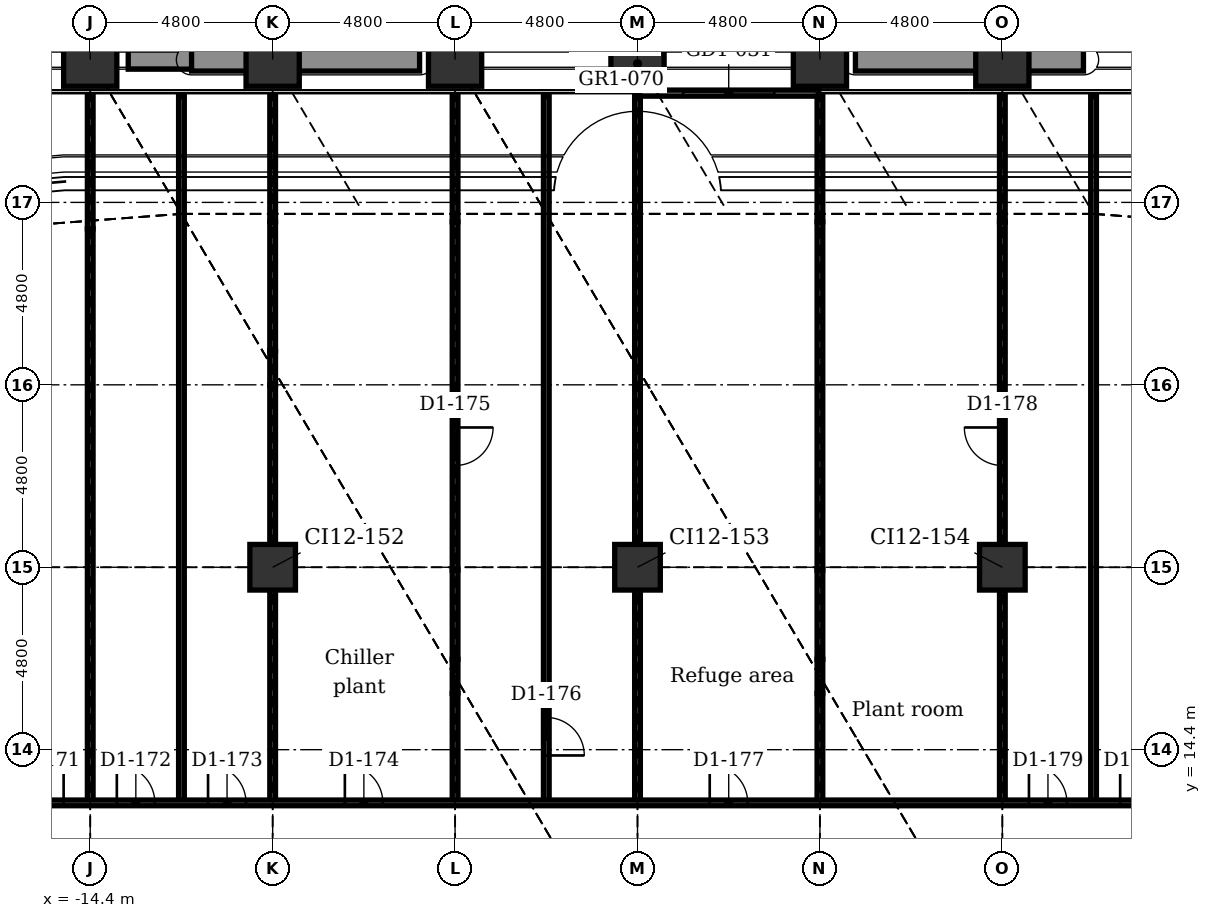
"""IFC4 building model, lengths in metres.
Left out: names, types, materials, properties, quantities, classifications, styles, units other than length and angle.
Written with IfcOpenShell. Run it as: python <this file> out.ifc"""

import sys

from ifc_helpers import new_model, si_unit, direction, frame, frame_2d, origin, origin_2d, place, context, subcontext, project, spatial, rectangle, extrude, element, fill, save


model = new_model("IFC4")
c1 = context("Model", 3, precision=1e-05, world=origin(), true_north=direction((0.0, 1.0)))
c2 = subcontext(c1, "Body", "Model", "MODEL_VIEW")
j1 = project(units=[si_unit("LENGTHUNIT", "METRE"), si_unit("PLANEANGLEUNIT", "RADIAN")], contexts=[c1])
p1 = place(None, origin())
s1 = spatial("IfcSite", under=j1, at=p1, CompositionType="ELEMENT")
p2 = place(p1, origin())
s2 = spatial("IfcBuilding", under=s1, at=p2, CompositionType="ELEMENT")
p3 = place(p2, frame((0.0, 0.0, 71.9)))
s3 = spatial("IfcBuildingStorey", under=s2, at=p3, CompositionType="ELEMENT", Elevation=71.9)
for number, where, z_axis, x_axis in (
    (1, (-14.4, 32.555, -0.3), (0.0, 0.0, 1.0), (1.0, 0.0, 0.0)),
    (2, (-9.6, 32.555, -0.3), (0.0, 0.0, 1.0), (1.0, 0.0, 0.0)),
    (3, (-4.8, 32.555, -0.3), (0.0, 0.0, 1.0), (1.0, 0.0, 0.0)),
    (4, (0.0, 32.555, -0.3), (0.0, 0.0, 1.0), (1.0, 0.0, 0.0)),
    (5, (4.8, 32.555, -0.3), (0.0, 0.0, 1.0), (1.0, 0.0, 0.0)),
    (6, (9.6, 32.555, -0.3), (0.0, 0.0, 1.0), (1.0, 0.0, 0.0)),
):
    element("IfcColumn", number, at=place(p3, frame(where, z_axis=z_axis, x_axis=x_axis)), inside=s3, PredefinedType="COLUMN", context=c2, shape_type="SweptSolid", body=[
        extrude(rectangle(XDim=1.4, YDim=1.4, at=origin_2d()), origin(), (0.0, 0.0, 1.0), 6.1),
    ])
for number, where, z_axis, x_axis in (
    (7, (-9.6, 19.2, -0.3), (0.0, 0.0, 1.0), (1.0, 0.0, 0.0)),
    (8, (0.0, 19.2, -0.3), (0.0, 0.0, 1.0), (1.0, 0.0, 0.0)),
    (9, (9.6, 19.2, -0.3), (0.0, 0.0, 1.0), (1.0, 0.0, 0.0)),
):
    element("IfcColumn", number, at=place(p3, frame(where, z_axis=z_axis, x_axis=x_axis)), inside=s3, PredefinedType="COLUMN", context=c2, shape_type="SweptSolid", body=[
        extrude(rectangle(XDim=1.2, YDim=1.2, at=origin_2d()), origin(), (0.0, 0.0, 1.0), 6.1),
    ])
p4 = place(p3, frame((0.03, 31.675, 0.0), z_axis=(0.0, 0.0, 1.0), x_axis=(1.0, 0.0, 0.0)))
e10 = element("IfcWall", 10, at=p4, inside=s3, PredefinedType="PARTITIONING", context=c2, shape_type="SweptSolid", body=[
    extrude(rectangle(XDim=4.74, YDim=0.16, at=frame_2d((2.37, 0.0))), origin(), (0.0, 0.0, 1.0), 5.7),
])
p5 = place(p4, frame((1.17, 0.0, 0.0)))
e11 = element("IfcOpeningElement", 11, at=p5, cuts=e10, PredefinedType="OPENING", context=c2, shape_type="SweptSolid", body=[
    extrude(rectangle(XDim=2.4, YDim=2.4, at=frame_2d((1.2, 1.2))), frame((0.0, 0.09, 0.0), z_axis=(0.0, -1.0, 0.0), x_axis=(1.0, 0.0, 0.0)), (0.0, 0.0, 1.0), 0.18),
])
p6 = place(p3, frame((-13.4, 32.605, 0.0), z_axis=(0.0, 0.0, 1.0), x_axis=(1.0, 0.0, 0.0)))
e12 = element("IfcWall", 12, at=p6, inside=s3, PredefinedType="USERDEFINED", context=c2, shape_type="SweptSolid", body=[
    extrude(rectangle(XDim=2.8, YDim=0.6, at=frame_2d((1.4, 0.0))), origin(), (0.0, 0.0, 1.0), 0.7),
])
for number, where, z_axis, x_axis in (
    (13, (-11.734, 32.555, 6.0), (0.0, 0.0, 1.0), (1.0, 0.0, 0.0)),
    (14, (5.734, 32.555, 6.0), (0.0, 0.0, 1.0), (1.0, 0.0, 0.0)),
):
    element("IfcWall", number, at=place(p3, frame(where, z_axis=z_axis, x_axis=x_axis)), inside=s3, PredefinedType="USERDEFINED", context=c2, shape_type="SweptSolid", body=[
        extrude(rectangle(XDim=6.0, YDim=0.6, at=frame_2d((3.0, 0.0))), origin(), (0.0, 0.0, 1.0), 0.7),
    ])
p7 = place(p3, frame((12.0, 13.0, 0.0), z_axis=(0.0, 0.0, 1.0), x_axis=(0.0, 1.0, 0.0)))
e15 = element("IfcWall", 15, at=p7, inside=s3, PredefinedType="PARTITIONING", context=c2, shape_type="SweptSolid", body=[
    extrude(rectangle(XDim=18.585, YDim=0.15, at=frame_2d((9.293, 0.0))), origin(), (0.0, 0.0, 1.0), 5.7),
])
p8 = place(p3, frame((9.6, 13.0, 0.0), z_axis=(0.0, 0.0, 1.0), x_axis=(0.0, 1.0, 0.0)))
e16 = element("IfcWall", 16, at=p8, inside=s3, PredefinedType="PARTITIONING", context=c2, shape_type="SweptSolid", body=[
    extrude(rectangle(XDim=5.6, YDim=0.15, at=frame_2d((2.8, 0.0))), origin(), (0.0, 0.0, 1.0), 5.343),
])
p9 = place(p3, frame((9.6, 19.8, 0.0), z_axis=(0.0, 0.0, 1.0), x_axis=(0.0, 1.0, 0.0)))
e17 = element("IfcWall", 17, at=p9, inside=s3, PredefinedType="PARTITIONING", context=c2, shape_type="SweptSolid", body=[
    extrude(rectangle(XDim=8.489, YDim=0.15, at=frame_2d((4.244, 0.0))), origin(), (0.0, 0.0, 1.0), 5.343),
])
p10 = place(p9, frame((2.078, 0.0, 0.0)))
e18 = element("IfcOpeningElement", 18, at=p10, cuts=e17, PredefinedType="OPENING", context=c2, shape_type="SweptSolid", body=[
    extrude(rectangle(XDim=1.0, YDim=2.1, at=frame_2d((0.5, 1.05))), frame((0.0, 0.085, 0.0), z_axis=(0.0, -1.0, 0.0), x_axis=(1.0, 0.0, 0.0)), (0.0, 0.0, 1.0), 0.17),
])
p11 = place(p3, frame((9.6, 28.289, 0.0), z_axis=(0.0, 0.0, 1.0), x_axis=(0.0, 1.0, 0.0)))
e19 = element("IfcWall", 19, at=p11, inside=s3, PredefinedType="PARTITIONING", context=c2, shape_type="SweptSolid", body=[
    extrude(rectangle(XDim=3.297, YDim=0.15, at=frame_2d((1.648, 0.0))), origin(), (0.0, 0.0, 1.0), 5.7),
])
p12 = place(p3, frame((4.8, 19.126, 0.0), z_axis=(0.0, 0.0, 1.0), x_axis=(0.0, 1.0, 0.0)))
e20 = element("IfcWall", 20, at=p12, inside=s3, PredefinedType="PARTITIONING", context=c2, shape_type="SweptSolid", body=[
    extrude(rectangle(XDim=9.163, YDim=0.15, at=frame_2d((4.581, 0.0))), origin(), (0.0, 0.0, 1.0), 5.343),
])
p13 = place(p3, frame((4.8, 13.0, 0.0), z_axis=(0.0, 0.0, 1.0), x_axis=(0.0, 1.0, 0.0)))
e21 = element("IfcWall", 21, at=p13, inside=s3, PredefinedType="PARTITIONING", context=c2, shape_type="SweptSolid", body=[
    extrude(rectangle(XDim=2.877, YDim=0.15, at=frame_2d((1.438, 0.0))), origin(), (0.0, 0.0, 1.0), 5.49),
])
p14 = place(p3, frame((4.8, 15.877, 0.0), z_axis=(0.0, 0.0, 1.0), x_axis=(0.0, 1.0, 0.0)))
e22 = element("IfcWall", 22, at=p14, inside=s3, PredefinedType="PARTITIONING", context=c2, shape_type="SweptSolid", body=[
    extrude(rectangle(XDim=0.902, YDim=0.15, at=frame_2d((0.451, 0.0))), origin(), (0.0, 0.0, 1.0), 5.7),
])
p15 = place(p3, frame((4.8, 16.779, 0.0), z_axis=(0.0, 0.0, 1.0), x_axis=(0.0, 1.0, 0.0)))
e23 = element("IfcWall", 23, at=p15, inside=s3, PredefinedType="PARTITIONING", context=c2, shape_type="SweptSolid", body=[
    extrude(rectangle(XDim=2.347, YDim=0.15, at=frame_2d((1.174, 0.0))), origin(), (0.0, 0.0, 1.0), 5.49),
])
p16 = place(p3, frame((4.8, 28.289, 0.0), z_axis=(0.0, 0.0, 1.0), x_axis=(0.0, 1.0, 0.0)))
e24 = element("IfcWall", 24, at=p16, inside=s3, PredefinedType="PARTITIONING", context=c2, shape_type="SweptSolid", body=[
    extrude(rectangle(XDim=3.307, YDim=0.15, at=frame_2d((1.653, 0.0))), origin(), (0.0, 0.0, 1.0), 5.7),
])
p17 = place(p3, frame((0.0, 13.0, 0.0), z_axis=(0.0, 0.0, 1.0), x_axis=(0.0, 1.0, 0.0)))
e25 = element("IfcWall", 25, at=p17, inside=s3, PredefinedType="PARTITIONING", context=c2, shape_type="SweptSolid", body=[
    extrude(rectangle(XDim=5.6, YDim=0.15, at=frame_2d((2.8, 0.0))), origin(), (0.0, 0.0, 1.0), 5.343),
])
p18 = place(p3, frame((0.0, 19.8, 0.0), z_axis=(0.0, 0.0, 1.0), x_axis=(0.0, 1.0, 0.0)))
e26 = element("IfcWall", 26, at=p18, inside=s3, PredefinedType="PARTITIONING", context=c2, shape_type="SweptSolid", body=[
    extrude(rectangle(XDim=4.19, YDim=0.15, at=frame_2d((2.095, 0.0))), origin(), (0.0, 0.0, 1.0), 5.49),
])
p19 = place(p3, frame((0.0, 23.99, 0.0), z_axis=(0.0, 0.0, 1.0), x_axis=(0.0, 1.0, 0.0)))
e27 = element("IfcWall", 27, at=p19, inside=s3, PredefinedType="PARTITIONING", context=c2, shape_type="SweptSolid", body=[
    extrude(rectangle(XDim=0.902, YDim=0.15, at=frame_2d((0.451, 0.0))), origin(), (0.0, 0.0, 1.0), 5.7),
])
p20 = place(p3, frame((0.0, 24.893, 0.0), z_axis=(0.0, 0.0, 1.0), x_axis=(0.0, 1.0, 0.0)))
e28 = element("IfcWall", 28, at=p20, inside=s3, PredefinedType="PARTITIONING", context=c2, shape_type="SweptSolid", body=[
    extrude(rectangle(XDim=3.396, YDim=0.15, at=frame_2d((1.698, 0.0))), origin(), (0.0, 0.0, 1.0), 5.49),
])
p21 = place(p3, frame((0.0, 28.289, 0.0), z_axis=(0.0, 0.0, 1.0), x_axis=(0.0, 1.0, 0.0)))
e29 = element("IfcWall", 29, at=p21, inside=s3, PredefinedType="PARTITIONING", context=c2, shape_type="SweptSolid", body=[
    extrude(rectangle(XDim=3.307, YDim=0.15, at=frame_2d((1.653, 0.0))), origin(), (0.0, 0.0, 1.0), 5.7),
])
p22 = place(p3, frame((-2.4, 13.0, 0.0), z_axis=(0.0, 0.0, 1.0), x_axis=(0.0, 1.0, 0.0)))
e30 = element("IfcWall", 30, at=p22, inside=s3, PredefinedType="PARTITIONING", context=c2, shape_type="SweptSolid", body=[
    extrude(rectangle(XDim=18.585, YDim=0.15, at=frame_2d((9.293, 0.0))), origin(), (0.0, 0.0, 1.0), 5.7),
])
p23 = place(p22, frame((1.248, 0.0, 0.0)))
e31 = element("IfcOpeningElement", 31, at=p23, cuts=e30, PredefinedType="OPENING", context=c2, shape_type="SweptSolid", body=[
    extrude(rectangle(XDim=1.0, YDim=2.1, at=frame_2d((0.5, 1.05))), frame((0.0, 0.085, 0.0), z_axis=(0.0, -1.0, 0.0), x_axis=(1.0, 0.0, 0.0)), (0.0, 0.0, 1.0), 0.17),
])
p24 = place(p3, frame((-4.8, 19.126, 0.0), z_axis=(0.0, 0.0, 1.0), x_axis=(0.0, 1.0, 0.0)))
e32 = element("IfcWall", 32, at=p24, inside=s3, PredefinedType="PARTITIONING", context=c2, shape_type="SweptSolid", body=[
    extrude(rectangle(XDim=9.163, YDim=0.15, at=frame_2d((4.581, 0.0))), origin(), (0.0, 0.0, 1.0), 5.343),
])
p25 = place(p24, frame((2.752, 0.0, 0.0)))
e33 = element("IfcOpeningElement", 33, at=p25, cuts=e32, PredefinedType="OPENING", context=c2, shape_type="SweptSolid", body=[
    extrude(rectangle(XDim=1.0, YDim=2.1, at=frame_2d((0.5, 1.05))), frame((0.0, 0.085, 0.0), z_axis=(0.0, -1.0, 0.0), x_axis=(1.0, 0.0, 0.0)), (0.0, 0.0, 1.0), 0.17),
])
p26 = place(p3, frame((-4.8, 13.0, 0.0), z_axis=(0.0, 0.0, 1.0), x_axis=(0.0, 1.0, 0.0)))
e34 = element("IfcWall", 34, at=p26, inside=s3, PredefinedType="PARTITIONING", context=c2, shape_type="SweptSolid", body=[
    extrude(rectangle(XDim=2.877, YDim=0.15, at=frame_2d((1.438, 0.0))), origin(), (0.0, 0.0, 1.0), 5.49),
])
p27 = place(p3, frame((-4.8, 15.877, 0.0), z_axis=(0.0, 0.0, 1.0), x_axis=(0.0, 1.0, 0.0)))
e35 = element("IfcWall", 35, at=p27, inside=s3, PredefinedType="PARTITIONING", context=c2, shape_type="SweptSolid", body=[
    extrude(rectangle(XDim=0.902, YDim=0.15, at=frame_2d((0.451, 0.0))), origin(), (0.0, 0.0, 1.0), 5.7),
])
p28 = place(p3, frame((-4.8, 16.779, 0.0), z_axis=(0.0, 0.0, 1.0), x_axis=(0.0, 1.0, 0.0)))
e36 = element("IfcWall", 36, at=p28, inside=s3, PredefinedType="PARTITIONING", context=c2, shape_type="SweptSolid", body=[
    extrude(rectangle(XDim=2.347, YDim=0.15, at=frame_2d((1.174, 0.0))), origin(), (0.0, 0.0, 1.0), 5.49),
])
p29 = place(p3, frame((-4.8, 28.289, 0.0), z_axis=(0.0, 0.0, 1.0), x_axis=(0.0, 1.0, 0.0)))
e37 = element("IfcWall", 37, at=p29, inside=s3, PredefinedType="PARTITIONING", context=c2, shape_type="SweptSolid", body=[
    extrude(rectangle(XDim=3.297, YDim=0.15, at=frame_2d((1.648, 0.0))), origin(), (0.0, 0.0, 1.0), 5.7),
])
p30 = place(p3, frame((-9.6, 13.0, 0.0), z_axis=(0.0, 0.0, 1.0), x_axis=(0.0, 1.0, 0.0)))
e38 = element("IfcWall", 38, at=p30, inside=s3, PredefinedType="PARTITIONING", context=c2, shape_type="SweptSolid", body=[
    extrude(rectangle(XDim=5.6, YDim=0.15, at=frame_2d((2.8, 0.0))), origin(), (0.0, 0.0, 1.0), 5.343),
])
p31 = place(p3, frame((-9.6, 19.8, 0.0), z_axis=(0.0, 0.0, 1.0), x_axis=(0.0, 1.0, 0.0)))
e39 = element("IfcWall", 39, at=p31, inside=s3, PredefinedType="PARTITIONING", context=c2, shape_type="SweptSolid", body=[
    extrude(rectangle(XDim=4.19, YDim=0.15, at=frame_2d((2.095, 0.0))), origin(), (0.0, 0.0, 1.0), 5.49),
])
p32 = place(p3, frame((-9.6, 23.99, 0.0), z_axis=(0.0, 0.0, 1.0), x_axis=(0.0, 1.0, 0.0)))
e40 = element("IfcWall", 40, at=p32, inside=s3, PredefinedType="PARTITIONING", context=c2, shape_type="SweptSolid", body=[
    extrude(rectangle(XDim=0.902, YDim=0.15, at=frame_2d((0.451, 0.0))), origin(), (0.0, 0.0, 1.0), 5.7),
])
p33 = place(p3, frame((-9.6, 24.893, 0.0), z_axis=(0.0, 0.0, 1.0), x_axis=(0.0, 1.0, 0.0)))
e41 = element("IfcWall", 41, at=p33, inside=s3, PredefinedType="PARTITIONING", context=c2, shape_type="SweptSolid", body=[
    extrude(rectangle(XDim=3.396, YDim=0.15, at=frame_2d((1.698, 0.0))), origin(), (0.0, 0.0, 1.0), 5.49),
])
p34 = place(p3, frame((-9.6, 28.289, 0.0), z_axis=(0.0, 0.0, 1.0), x_axis=(0.0, 1.0, 0.0)))
e42 = element("IfcWall", 42, at=p34, inside=s3, PredefinedType="PARTITIONING", context=c2, shape_type="SweptSolid", body=[
    extrude(rectangle(XDim=3.297, YDim=0.15, at=frame_2d((1.648, 0.0))), origin(), (0.0, 0.0, 1.0), 5.7),
])
p35 = place(p3, frame((-12.0, 13.0, 0.0), z_axis=(0.0, 0.0, 1.0), x_axis=(0.0, 1.0, 0.0)))
e43 = element("IfcWall", 43, at=p35, inside=s3, PredefinedType="PARTITIONING", context=c2, shape_type="SweptSolid", body=[
    extrude(rectangle(XDim=18.585, YDim=0.15, at=frame_2d((9.293, 0.0))), origin(), (0.0, 0.0, 1.0), 5.7),
])
p36 = place(p3, frame((-14.4, 13.0, 0.0), z_axis=(0.0, 0.0, 1.0), x_axis=(0.0, 1.0, 0.0)))
e44 = element("IfcWall", 44, at=p36, inside=s3, PredefinedType="PARTITIONING", context=c2, shape_type="SweptSolid", body=[
    extrude(rectangle(XDim=15.107, YDim=0.15, at=frame_2d((7.553, 0.0))), origin(), (0.0, 0.0, 1.0), 5.343),
])
p37 = place(p3, frame((-14.4, 28.107, 0.0), z_axis=(0.0, 0.0, 1.0), x_axis=(0.0, 1.0, 0.0)))
e45 = element("IfcWall", 45, at=p37, inside=s3, PredefinedType="PARTITIONING", context=c2, shape_type="SweptSolid", body=[
    extrude(rectangle(XDim=3.479, YDim=0.15, at=frame_2d((1.739, 0.0))), origin(), (0.0, 0.0, 1.0), 5.7),
])
p38 = place(p3, frame((-21.6, 13.0, 0.0), z_axis=(0.0, 0.0, 1.0), x_axis=(1.0, 0.0, 0.0)))
e46 = element("IfcWall", 46, at=p38, inside=s3, PredefinedType="PARTITIONING", context=c2, shape_type="SweptSolid", body=[
    extrude(rectangle(XDim=43.2, YDim=0.15, at=frame_2d((21.6, 0.0))), origin(), (0.0, 0.0, 1.0), 5.8),
])
p39 = place(p38, frame((5.5, 0.0, 0.0)))
e47 = element("IfcOpeningElement", 47, at=p39, cuts=e46, PredefinedType="OPENING", context=c2, shape_type="SweptSolid", body=[
    extrude(rectangle(XDim=1.0, YDim=2.1, at=frame_2d((0.5, 1.05))), frame((0.0, 0.085, 0.0), z_axis=(0.0, -1.0, 0.0), x_axis=(1.0, 0.0, 0.0)), (0.0, 0.0, 1.0), 0.17),
])
p40 = place(p38, frame((7.9, 0.0, 0.0)))
e48 = element("IfcOpeningElement", 48, at=p40, cuts=e46, PredefinedType="OPENING", context=c2, shape_type="SweptSolid", body=[
    extrude(rectangle(XDim=1.0, YDim=2.1, at=frame_2d((0.5, 1.05))), frame((0.0, 0.085, 0.0), z_axis=(0.0, -1.0, 0.0), x_axis=(1.0, 0.0, 0.0)), (0.0, 0.0, 1.0), 0.17),
])
p41 = place(p38, frame((10.3, 0.0, 0.0)))
e49 = element("IfcOpeningElement", 49, at=p41, cuts=e46, PredefinedType="OPENING", context=c2, shape_type="SweptSolid", body=[
    extrude(rectangle(XDim=1.0, YDim=2.1, at=frame_2d((0.5, 1.05))), frame((0.0, 0.085, 0.0), z_axis=(0.0, -1.0, 0.0), x_axis=(1.0, 0.0, 0.0)), (0.0, 0.0, 1.0), 0.17),
])
p42 = place(p38, frame((13.9, 0.0, 0.0)))
e50 = element("IfcOpeningElement", 50, at=p42, cuts=e46, PredefinedType="OPENING", context=c2, shape_type="SweptSolid", body=[
    extrude(rectangle(XDim=1.0, YDim=2.1, at=frame_2d((0.5, 1.05))), frame((0.0, 0.085, 0.0), z_axis=(0.0, -1.0, 0.0), x_axis=(1.0, 0.0, 0.0)), (0.0, 0.0, 1.0), 0.17),
])
p43 = place(p38, frame((23.5, 0.0, 0.0)))
e51 = element("IfcOpeningElement", 51, at=p43, cuts=e46, PredefinedType="OPENING", context=c2, shape_type="SweptSolid", body=[
    extrude(rectangle(XDim=1.0, YDim=2.1, at=frame_2d((0.5, 1.05))), frame((0.0, 0.085, 0.0), z_axis=(0.0, -1.0, 0.0), x_axis=(1.0, 0.0, 0.0)), (0.0, 0.0, 1.0), 0.17),
])
p44 = place(p38, frame((31.9, 0.0, 0.0)))
e52 = element("IfcOpeningElement", 52, at=p44, cuts=e46, PredefinedType="OPENING", context=c2, shape_type="SweptSolid", body=[
    extrude(rectangle(XDim=1.0, YDim=2.1, at=frame_2d((0.5, 1.05))), frame((0.0, 0.085, 0.0), z_axis=(0.0, -1.0, 0.0), x_axis=(1.0, 0.0, 0.0)), (0.0, 0.0, 1.0), 0.17),
])
p45 = place(p38, frame((34.3, 0.0, 0.0)))
e53 = element("IfcOpeningElement", 53, at=p45, cuts=e46, PredefinedType="OPENING", context=c2, shape_type="SweptSolid", body=[
    extrude(rectangle(XDim=1.0, YDim=2.1, at=frame_2d((0.5, 1.05))), frame((0.0, 0.085, 0.0), z_axis=(0.0, -1.0, 0.0), x_axis=(1.0, 0.0, 0.0)), (0.0, 0.0, 1.0), 0.17),
])
p46 = place(p38, frame((36.7, 0.0, 0.0)))
e54 = element("IfcOpeningElement", 54, at=p46, cuts=e46, PredefinedType="OPENING", context=c2, shape_type="SweptSolid", body=[
    extrude(rectangle(XDim=1.0, YDim=2.1, at=frame_2d((0.5, 1.05))), frame((0.0, 0.085, 0.0), z_axis=(0.0, -1.0, 0.0), x_axis=(1.0, 0.0, 0.0)), (0.0, 0.0, 1.0), 0.17),
])
p47 = place(p5, origin())
e55 = element("IfcDoor", 55, at=p47, inside=s3, OperationType="DOUBLE_DOOR_SLIDING", PredefinedType="DOOR", context=c2, shape_type="SweptSolid", body=[
    extrude(rectangle(XDim=2.4, YDim=2.4, at=frame_2d((1.2, 1.2))), frame((0.0, 0.025, 0.0), z_axis=(0.0, -1.0, 0.0), x_axis=(1.0, 0.0, 0.0)), (0.0, 0.0, 1.0), 0.05),
])
fill(e11, e55)
p48 = place(p39, origin())
e56 = element("IfcDoor", 56, at=p48, inside=s3, OperationType="SINGLE_SWING_RIGHT", PredefinedType="DOOR", context=c2, shape_type="SweptSolid", body=[
    extrude(rectangle(XDim=1.0, YDim=2.1, at=frame_2d((0.5, 1.05))), frame((0.0, 0.025, 0.0), z_axis=(0.0, -1.0, 0.0), x_axis=(1.0, 0.0, 0.0)), (0.0, 0.0, 1.0), 0.05),
])
fill(e47, e56)
p49 = place(p40, origin())
e57 = element("IfcDoor", 57, at=p49, inside=s3, OperationType="SINGLE_SWING_LEFT", PredefinedType="DOOR", context=c2, shape_type="SweptSolid", body=[
    extrude(rectangle(XDim=1.0, YDim=2.1, at=frame_2d((0.5, 1.05))), frame((0.0, 0.025, 0.0), z_axis=(0.0, -1.0, 0.0), x_axis=(1.0, 0.0, 0.0)), (0.0, 0.0, 1.0), 0.05),
])
fill(e48, e57)
p50 = place(p41, origin())
e58 = element("IfcDoor", 58, at=p50, inside=s3, OperationType="SINGLE_SWING_LEFT", PredefinedType="DOOR", context=c2, shape_type="SweptSolid", body=[
    extrude(rectangle(XDim=1.0, YDim=2.1, at=frame_2d((0.5, 1.05))), frame((0.0, 0.025, 0.0), z_axis=(0.0, -1.0, 0.0), x_axis=(1.0, 0.0, 0.0)), (0.0, 0.0, 1.0), 0.05),
])
fill(e49, e58)
p51 = place(p42, origin())
e59 = element("IfcDoor", 59, at=p51, inside=s3, OperationType="SINGLE_SWING_LEFT", PredefinedType="DOOR", context=c2, shape_type="SweptSolid", body=[
    extrude(rectangle(XDim=1.0, YDim=2.1, at=frame_2d((0.5, 1.05))), frame((0.0, 0.025, 0.0), z_axis=(0.0, -1.0, 0.0), x_axis=(1.0, 0.0, 0.0)), (0.0, 0.0, 1.0), 0.05),
])
fill(e50, e59)
p52 = place(p25, frame((1.0, 0.0, 0.0), z_axis=(0.0, 0.0, 1.0), x_axis=(-1.0, 0.0, 0.0)))
e60 = element("IfcDoor", 60, at=p52, inside=s3, OperationType="SINGLE_SWING_RIGHT", PredefinedType="DOOR", context=c2, shape_type="SweptSolid", body=[
    extrude(rectangle(XDim=1.0, YDim=2.1, at=frame_2d((0.5, 1.05))), frame((0.0, 0.025, 0.0), z_axis=(0.0, -1.0, 0.0), x_axis=(1.0, 0.0, 0.0)), (0.0, 0.0, 1.0), 0.05),
])
fill(e33, e60)
p53 = place(p23, frame((1.0, 0.0, 0.0), z_axis=(0.0, 0.0, 1.0), x_axis=(-1.0, 0.0, 0.0)))
e61 = element("IfcDoor", 61, at=p53, inside=s3, OperationType="SINGLE_SWING_LEFT", PredefinedType="DOOR", context=c2, shape_type="SweptSolid", body=[
    extrude(rectangle(XDim=1.0, YDim=2.1, at=frame_2d((0.5, 1.05))), frame((0.0, 0.025, 0.0), z_axis=(0.0, -1.0, 0.0), x_axis=(1.0, 0.0, 0.0)), (0.0, 0.0, 1.0), 0.05),
])
fill(e31, e61)
p54 = place(p43, origin())
e62 = element("IfcDoor", 62, at=p54, inside=s3, OperationType="SINGLE_SWING_LEFT", PredefinedType="DOOR", context=c2, shape_type="SweptSolid", body=[
    extrude(rectangle(XDim=1.0, YDim=2.1, at=frame_2d((0.5, 1.05))), frame((0.0, 0.025, 0.0), z_axis=(0.0, -1.0, 0.0), x_axis=(1.0, 0.0, 0.0)), (0.0, 0.0, 1.0), 0.05),
])
fill(e51, e62)
p55 = place(p10, origin())
e63 = element("IfcDoor", 63, at=p55, inside=s3, OperationType="SINGLE_SWING_RIGHT", PredefinedType="DOOR", context=c2, shape_type="SweptSolid", body=[
    extrude(rectangle(XDim=1.0, YDim=2.1, at=frame_2d((0.5, 1.05))), frame((0.0, 0.025, 0.0), z_axis=(0.0, -1.0, 0.0), x_axis=(1.0, 0.0, 0.0)), (0.0, 0.0, 1.0), 0.05),
])
fill(e18, e63)
p56 = place(p44, origin())
e64 = element("IfcDoor", 64, at=p56, inside=s3, OperationType="SINGLE_SWING_LEFT", PredefinedType="DOOR", context=c2, shape_type="SweptSolid", body=[
    extrude(rectangle(XDim=1.0, YDim=2.1, at=frame_2d((0.5, 1.05))), frame((0.0, 0.025, 0.0), z_axis=(0.0, -1.0, 0.0), x_axis=(1.0, 0.0, 0.0)), (0.0, 0.0, 1.0), 0.05),
])
fill(e52, e64)
p57 = place(p45, origin())
e65 = element("IfcDoor", 65, at=p57, inside=s3, OperationType="SINGLE_SWING_LEFT", PredefinedType="DOOR", context=c2, shape_type="SweptSolid", body=[
    extrude(rectangle(XDim=1.0, YDim=2.1, at=frame_2d((0.5, 1.05))), frame((0.0, 0.025, 0.0), z_axis=(0.0, -1.0, 0.0), x_axis=(1.0, 0.0, 0.0)), (0.0, 0.0, 1.0), 0.05),
])
fill(e53, e65)
save(model, sys.argv[1])
